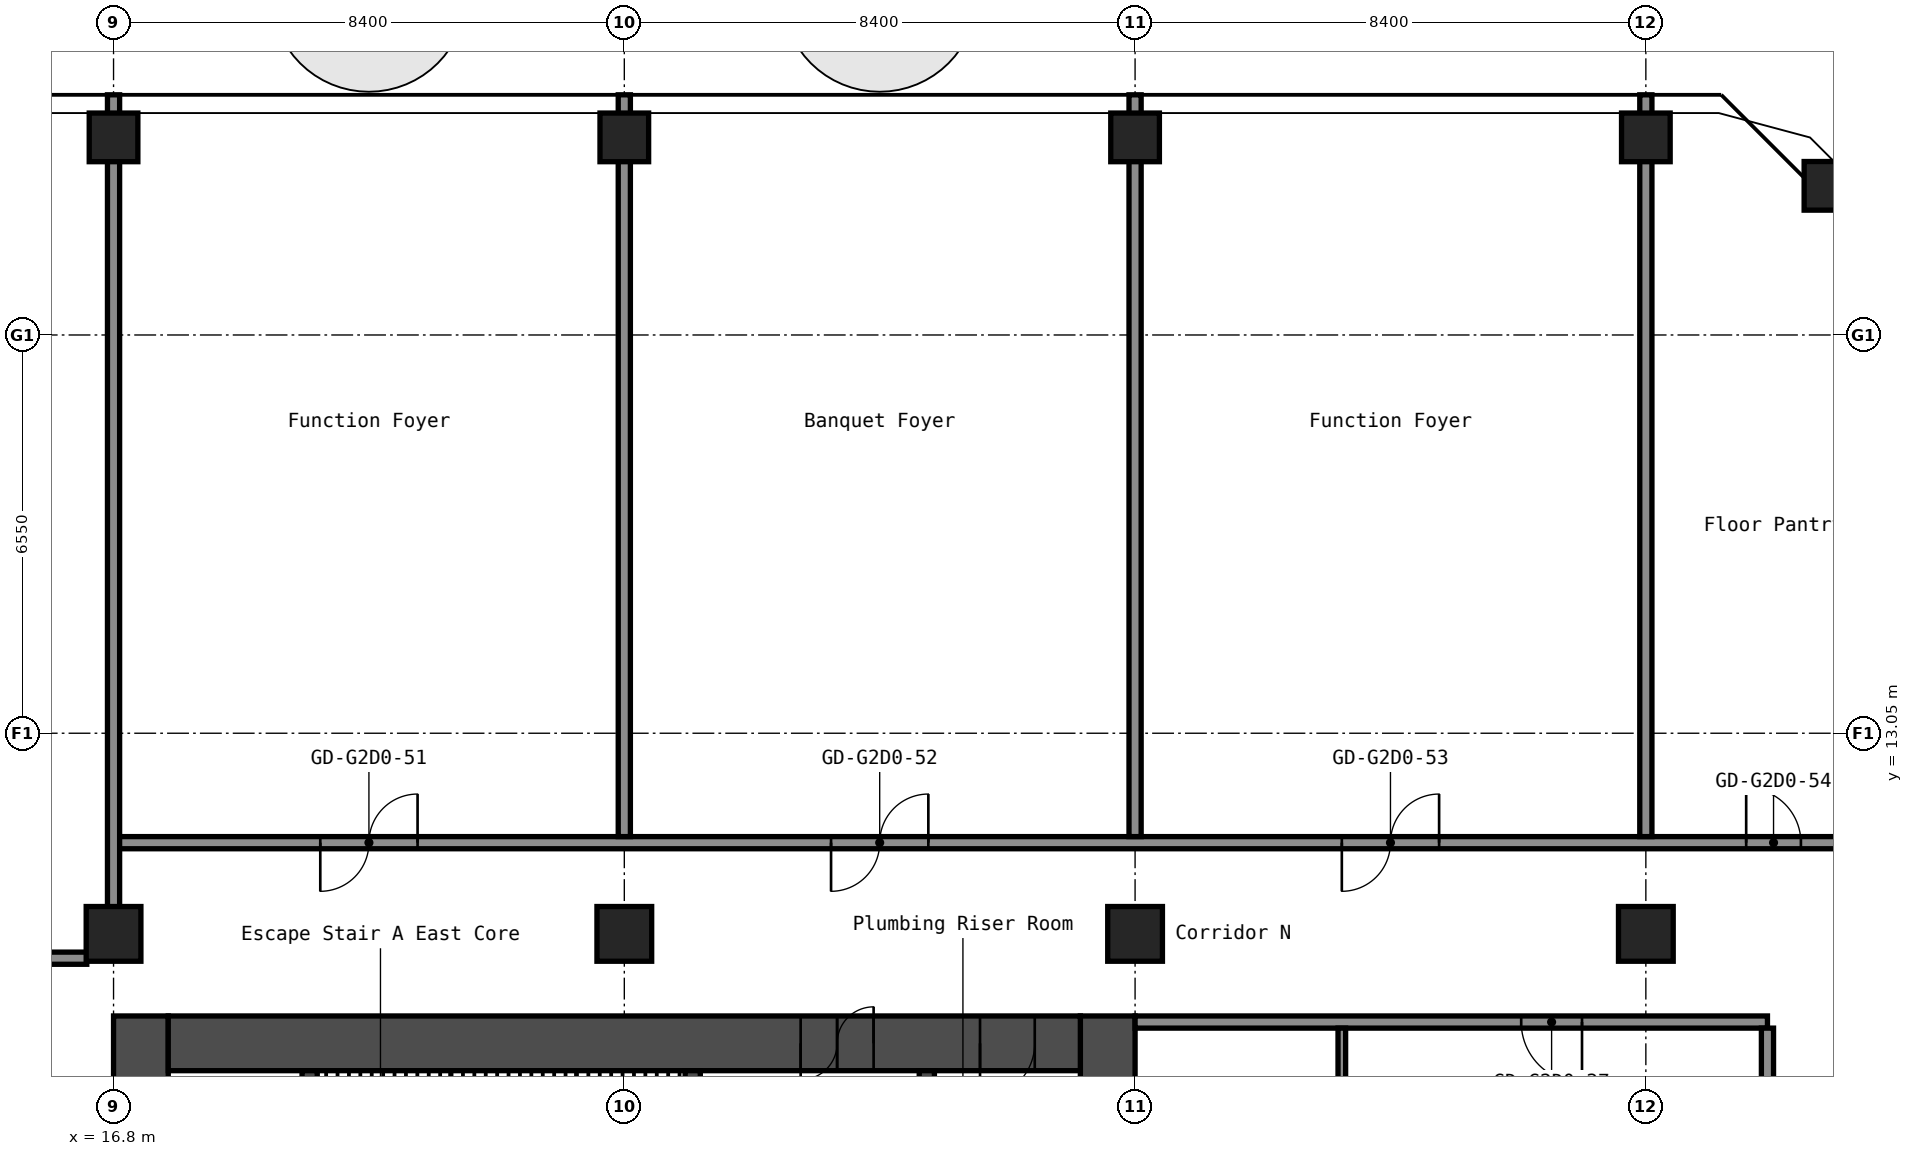
"""IFC4 building model, lengths in metres.
Left out: names, types, materials, properties, quantities, classifications, styles, units other than length and angle.
Written with IfcOpenShell. Run it as: python <this file> out.ifc"""

import sys

from ifc_helpers import new_model, si_unit, direction, frame, frame_2d, origin, origin_2d, place, context, subcontext, project, spatial, rectangle, hollow_rectangle, extrude, element, fill, save


model = new_model("IFC4")
c1 = context("Model", 3, precision=1e-05, world=origin(), true_north=direction((0.0, 1.0)))
c2 = subcontext(c1, "Body", "Model", "MODEL_VIEW")
j1 = project(units=[si_unit("LENGTHUNIT", "METRE"), si_unit("PLANEANGLEUNIT", "RADIAN")], contexts=[c1])
p1 = place(None, origin())
s1 = spatial("IfcSite", under=j1, at=p1, CompositionType="ELEMENT")
p2 = place(p1, origin())
s2 = spatial("IfcBuilding", under=s1, at=p2, CompositionType="ELEMENT")
p3 = place(p2, frame((0.0, 0.0, 85.0)))
s3 = spatial("IfcBuildingStorey", under=s2, at=p3, CompositionType="ELEMENT", Elevation=85.0)
p4 = place(p3, frame((16.8, 9.75, 0.0), z_axis=(0.0, 0.0, 1.0), x_axis=(1.0, 0.0, 0.0)))
e1 = element("IfcColumn", 1, at=p4, inside=s3, PredefinedType="COLUMN", context=c2, shape_type="SweptSolid", body=[
    extrude(hollow_rectangle(XDim=0.9, YDim=0.9, WallThickness=0.036, at=origin_2d()), origin(), (0.0, 0.0, 1.0), 2.8),
])
p5 = place(p3, frame((16.8, 22.85, 0.0), z_axis=(0.0, 0.0, 1.0), x_axis=(1.0, 0.0, 0.0)))
e2 = element("IfcColumn", 2, at=p5, inside=s3, PredefinedType="COLUMN", context=c2, shape_type="SweptSolid", body=[
    extrude(hollow_rectangle(XDim=0.8, YDim=0.8, WallThickness=0.032, at=origin_2d()), origin(), (0.0, 0.0, 1.0), 2.8),
])
p6 = place(p3, frame((25.2, 9.75, 0.0), z_axis=(0.0, 0.0, 1.0), x_axis=(1.0, 0.0, 0.0)))
e3 = element("IfcColumn", 3, at=p6, inside=s3, PredefinedType="COLUMN", context=c2, shape_type="SweptSolid", body=[
    extrude(hollow_rectangle(XDim=0.9, YDim=0.9, WallThickness=0.036, at=origin_2d()), origin(), (0.0, 0.0, 1.0), 2.8),
])
p7 = place(p3, frame((25.2, 22.85, 0.0), z_axis=(0.0, 0.0, 1.0), x_axis=(1.0, 0.0, 0.0)))
e4 = element("IfcColumn", 4, at=p7, inside=s3, PredefinedType="COLUMN", context=c2, shape_type="SweptSolid", body=[
    extrude(hollow_rectangle(XDim=0.8, YDim=0.8, WallThickness=0.032, at=origin_2d()), origin(), (0.0, 0.0, 1.0), 2.8),
])
p8 = place(p3, frame((33.6, 9.75, 0.0), z_axis=(0.0, 0.0, 1.0), x_axis=(1.0, 0.0, 0.0)))
e5 = element("IfcColumn", 5, at=p8, inside=s3, PredefinedType="COLUMN", context=c2, shape_type="SweptSolid", body=[
    extrude(hollow_rectangle(XDim=0.9, YDim=0.9, WallThickness=0.036, at=origin_2d()), origin(), (0.0, 0.0, 1.0), 2.8),
])
p9 = place(p3, frame((33.6, 22.85, 0.0), z_axis=(0.0, 0.0, 1.0), x_axis=(1.0, 0.0, 0.0)))
e6 = element("IfcColumn", 6, at=p9, inside=s3, PredefinedType="COLUMN", context=c2, shape_type="SweptSolid", body=[
    extrude(hollow_rectangle(XDim=0.8, YDim=0.8, WallThickness=0.032, at=origin_2d()), origin(), (0.0, 0.0, 1.0), 2.8),
])
p10 = place(p3, frame((42.0, 9.75, 0.0), z_axis=(0.0, 0.0, 1.0), x_axis=(1.0, 0.0, 0.0)))
e7 = element("IfcColumn", 7, at=p10, inside=s3, PredefinedType="COLUMN", context=c2, shape_type="SweptSolid", body=[
    extrude(hollow_rectangle(XDim=0.9, YDim=0.9, WallThickness=0.036, at=origin_2d()), origin(), (0.0, 0.0, 1.0), 2.8),
])
for number, where, z_axis, x_axis in (
    (8, (42.0, 22.85, 0.0), (0.0, 0.0, 1.0), (1.0, 0.0, 0.0)),
    (9, (45.003, 22.053, 0.0), (0.0, 0.0, 1.0), (1.0, 0.0, 0.0)),
):
    element("IfcColumn", number, at=place(p3, frame(where, z_axis=z_axis, x_axis=x_axis)), inside=s3, PredefinedType="COLUMN", context=c2, shape_type="SweptSolid", body=[
        extrude(hollow_rectangle(XDim=0.8, YDim=0.8, WallThickness=0.032, at=origin_2d()), origin(), (0.0, 0.0, 1.0), 2.8),
    ])
p11 = place(p3, frame((17.25, -8.4, 0.0), z_axis=(0.0, 0.0, 1.0), x_axis=(0.0, 1.0, 0.0)))
e10 = element("IfcWall", 10, at=p11, inside=s3, PredefinedType="SHEAR", context=c2, shape_type="SweptSolid", body=[
    extrude(rectangle(XDim=16.8, YDim=0.9, at=frame_2d((8.4, 0.0))), origin(), (0.0, 0.0, 1.0), 2.8),
])
p12 = place(p11, frame((7.6, 0.0, 0.0)))
e11 = element("IfcOpeningElement", 11, at=p12, cuts=e10, PredefinedType="OPENING", context=c2, shape_type="SweptSolid", body=[
    extrude(rectangle(XDim=1.2, YDim=2.1, at=frame_2d((0.6, 1.05))), frame((0.0, 0.46, 0.0), z_axis=(0.0, -1.0, 0.0), x_axis=(1.0, 0.0, 0.0)), (0.0, 0.0, 1.0), 0.92),
])
p13 = place(p3, frame((33.15, -8.4, 0.0), z_axis=(0.0, 0.0, 1.0), x_axis=(0.0, 1.0, 0.0)))
e12 = element("IfcWall", 12, at=p13, inside=s3, PredefinedType="SHEAR", context=c2, shape_type="SweptSolid", body=[
    extrude(rectangle(XDim=16.8, YDim=0.9, at=frame_2d((8.4, 0.0))), origin(), (0.0, 0.0, 1.0), 2.8),
])
p14 = place(p3, frame((17.7, 7.95, 0.0), z_axis=(0.0, 0.0, 1.0), x_axis=(1.0, 0.0, 0.0)))
e13 = element("IfcWall", 13, at=p14, inside=s3, PredefinedType="SHEAR", context=c2, shape_type="SweptSolid", body=[
    extrude(rectangle(XDim=15.0, YDim=0.9, at=frame_2d((7.5, 0.0))), origin(), (0.0, 0.0, 1.0), 2.8),
])
p15 = place(p14, frame((10.4, 0.0, 0.0)))
e14 = element("IfcOpeningElement", 14, at=p15, cuts=e13, PredefinedType="OPENING", context=c2, shape_type="SweptSolid", body=[
    extrude(rectangle(XDim=1.2, YDim=2.1, at=frame_2d((0.6, 1.05))), frame((0.0, 0.46, 0.0), z_axis=(0.0, -1.0, 0.0), x_axis=(1.0, 0.0, 0.0)), (0.0, 0.0, 1.0), 0.92),
])
p16 = place(p14, frame((13.35, 0.0, 0.0)))
e15 = element("IfcOpeningElement", 15, at=p16, cuts=e13, PredefinedType="OPENING", context=c2, shape_type="SweptSolid", body=[
    extrude(rectangle(XDim=0.9, YDim=2.1, at=frame_2d((0.45, 1.05))), frame((0.0, 0.46, 0.0), z_axis=(0.0, -1.0, 0.0), x_axis=(1.0, 0.0, 0.0)), (0.0, 0.0, 1.0), 0.92),
])
p17 = place(p3, frame((20.025, 1.2, 0.0), z_axis=(0.0, 0.0, 1.0), x_axis=(0.0, 1.0, 0.0)))
e16 = element("IfcWall", 16, at=p17, inside=s3, PredefinedType="SHEAR", context=c2, shape_type="SweptSolid", body=[
    extrude(rectangle(XDim=6.3, YDim=0.25, at=frame_2d((3.15, 0.0))), origin(), (0.0, 0.0, 1.0), 2.8),
])
p18 = place(p3, frame((26.325, 3.75, 0.0), z_axis=(0.0, 0.0, 1.0), x_axis=(0.0, 1.0, 0.0)))
e17 = element("IfcWall", 17, at=p18, inside=s3, PredefinedType="SHEAR", context=c2, shape_type="SweptSolid", body=[
    extrude(rectangle(XDim=3.75, YDim=0.25, at=frame_2d((1.875, 0.0))), origin(), (0.0, 0.0, 1.0), 2.8),
])
p19 = place(p18, frame((1.25, 0.0, 0.0)))
e18 = element("IfcOpeningElement", 18, at=p19, cuts=e17, PredefinedType="OPENING", context=c2, shape_type="SweptSolid", body=[
    extrude(rectangle(XDim=1.2, YDim=2.1, at=frame_2d((0.6, 1.05))), frame((0.0, 0.135, 0.0), z_axis=(0.0, -1.0, 0.0), x_axis=(1.0, 0.0, 0.0)), (0.0, 0.0, 1.0), 0.27),
])
p20 = place(p3, frame((30.175, 1.45, 0.0), z_axis=(0.0, 0.0, 1.0), x_axis=(0.0, 1.0, 0.0)))
e19 = element("IfcWall", 19, at=p20, inside=s3, PredefinedType="SHEAR", context=c2, shape_type="SweptSolid", body=[
    extrude(rectangle(XDim=6.05, YDim=0.25, at=frame_2d((3.025, 0.0))), origin(), (0.0, 0.0, 1.0), 2.8),
])
p21 = place(p20, frame((2.625, 0.0, 0.0)))
e20 = element("IfcOpeningElement", 20, at=p21, cuts=e19, PredefinedType="OPENING", context=c2, shape_type="SweptSolid", body=[
    extrude(rectangle(XDim=1.1, YDim=2.1, at=frame_2d((0.55, 1.05))), frame((0.0, 0.135, 0.0), z_axis=(0.0, -1.0, 0.0), x_axis=(1.0, 0.0, 0.0)), (0.0, 0.0, 1.0), 0.27),
])
p22 = place(p3, frame((33.6, 8.3, 0.0), z_axis=(0.0, 0.0, 1.0), x_axis=(1.0, 0.0, 0.0)))
e21 = element("IfcWall", 21, at=p22, inside=s3, PredefinedType="PARTITIONING", context=c2, shape_type="SweptSolid", body=[
    extrude(rectangle(XDim=10.4, YDim=0.2, at=frame_2d((5.2, 0.0))), origin(), (0.0, 0.0, 1.0), 2.8),
])
p23 = place(p22, frame((6.35, 0.0, 0.0)))
e22 = element("IfcOpeningElement", 22, at=p23, cuts=e21, PredefinedType="OPENING", context=c2, shape_type="SweptSolid", body=[
    extrude(rectangle(XDim=1.0, YDim=2.1, at=frame_2d((0.5, 1.05))), frame((0.0, 0.11, 0.0), z_axis=(0.0, -1.0, 0.0), x_axis=(1.0, 0.0, 0.0)), (0.0, 0.0, 1.0), 0.22),
])
p24 = place(p3, frame((-16.36, 9.35, 0.0), z_axis=(0.0, 0.0, 1.0), x_axis=(1.0, 0.0, 0.0)))
e23 = element("IfcWall", 23, at=p24, inside=s3, PredefinedType="PARTITIONING", context=c2, shape_type="SweptSolid", body=[
    extrude(rectangle(XDim=32.72, YDim=0.2, at=frame_2d((16.36, 0.0))), origin(), (0.0, 0.0, 1.0), 2.8),
])
p25 = place(p24, frame((2.41, 0.0, 0.0)))
e24 = element("IfcOpeningElement", 24, at=p25, cuts=e23, PredefinedType="OPENING", context=c2, shape_type="SweptSolid", body=[
    extrude(rectangle(XDim=1.0, YDim=2.1, at=frame_2d((0.5, 1.05))), frame((0.0, 0.11, 0.0), z_axis=(0.0, -1.0, 0.0), x_axis=(1.0, 0.0, 0.0)), (0.0, 0.0, 1.0), 0.22),
])
p26 = place(p24, frame((4.11, 0.0, 0.0)))
e25 = element("IfcOpeningElement", 25, at=p26, cuts=e23, PredefinedType="OPENING", context=c2, shape_type="SweptSolid", body=[
    extrude(rectangle(XDim=1.0, YDim=2.1, at=frame_2d((0.5, 1.05))), frame((0.0, 0.11, 0.0), z_axis=(0.0, -1.0, 0.0), x_axis=(1.0, 0.0, 0.0)), (0.0, 0.0, 1.0), 0.22),
])
p27 = place(p24, frame((9.96, 0.0, 0.0)))
e26 = element("IfcOpeningElement", 26, at=p27, cuts=e23, PredefinedType="OPENING", context=c2, shape_type="SweptSolid", body=[
    extrude(rectangle(XDim=1.0, YDim=2.1, at=frame_2d((0.5, 1.05))), frame((0.0, 0.11, 0.0), z_axis=(0.0, -1.0, 0.0), x_axis=(1.0, 0.0, 0.0)), (0.0, 0.0, 1.0), 0.22),
])
p28 = place(p24, frame((19.21, 0.0, 0.0)))
e27 = element("IfcOpeningElement", 27, at=p28, cuts=e23, PredefinedType="OPENING", context=c2, shape_type="SweptSolid", body=[
    extrude(rectangle(XDim=1.0, YDim=2.1, at=frame_2d((0.5, 1.05))), frame((0.0, 0.11, 0.0), z_axis=(0.0, -1.0, 0.0), x_axis=(1.0, 0.0, 0.0)), (0.0, 0.0, 1.0), 0.22),
])
p29 = place(p24, frame((20.91, 0.0, 0.0)))
e28 = element("IfcOpeningElement", 28, at=p29, cuts=e23, PredefinedType="OPENING", context=c2, shape_type="SweptSolid", body=[
    extrude(rectangle(XDim=1.0, YDim=2.1, at=frame_2d((0.5, 1.05))), frame((0.0, 0.11, 0.0), z_axis=(0.0, -1.0, 0.0), x_axis=(1.0, 0.0, 0.0)), (0.0, 0.0, 1.0), 0.22),
])
p30 = place(p24, frame((30.16, 0.0, 0.0)))
e29 = element("IfcOpeningElement", 29, at=p30, cuts=e23, PredefinedType="OPENING", context=c2, shape_type="SweptSolid", body=[
    extrude(rectangle(XDim=1.0, YDim=2.1, at=frame_2d((0.5, 1.05))), frame((0.0, 0.11, 0.0), z_axis=(0.0, -1.0, 0.0), x_axis=(1.0, 0.0, 0.0)), (0.0, 0.0, 1.0), 0.22),
])
p31 = place(p3, frame((16.8, 11.25, 0.0), z_axis=(0.0, 0.0, 1.0), x_axis=(1.0, 0.0, 0.0)))
e30 = element("IfcWall", 30, at=p31, inside=s3, PredefinedType="PARTITIONING", context=c2, shape_type="SweptSolid", body=[
    extrude(rectangle(XDim=29.7, YDim=0.2, at=frame_2d((14.85, 0.0))), origin(), (0.0, 0.0, 1.0), 2.8),
])
p32 = place(p31, frame((3.4, 0.0, 0.0)))
e31 = element("IfcOpeningElement", 31, at=p32, cuts=e30, PredefinedType="OPENING", context=c2, shape_type="SweptSolid", body=[
    extrude(rectangle(XDim=1.6, YDim=2.1, at=frame_2d((0.8, 1.05))), frame((0.0, 0.11, 0.0), z_axis=(0.0, -1.0, 0.0), x_axis=(1.0, 0.0, 0.0)), (0.0, 0.0, 1.0), 0.22),
])
p33 = place(p31, frame((11.8, 0.0, 0.0)))
e32 = element("IfcOpeningElement", 32, at=p33, cuts=e30, PredefinedType="OPENING", context=c2, shape_type="SweptSolid", body=[
    extrude(rectangle(XDim=1.6, YDim=2.1, at=frame_2d((0.8, 1.05))), frame((0.0, 0.11, 0.0), z_axis=(0.0, -1.0, 0.0), x_axis=(1.0, 0.0, 0.0)), (0.0, 0.0, 1.0), 0.22),
])
p34 = place(p31, frame((20.2, 0.0, 0.0)))
e33 = element("IfcOpeningElement", 33, at=p34, cuts=e30, PredefinedType="OPENING", context=c2, shape_type="SweptSolid", body=[
    extrude(rectangle(XDim=1.6, YDim=2.1, at=frame_2d((0.8, 1.05))), frame((0.0, 0.11, 0.0), z_axis=(0.0, -1.0, 0.0), x_axis=(1.0, 0.0, 0.0)), (0.0, 0.0, 1.0), 0.22),
])
p35 = place(p31, frame((26.85, 0.0, 0.0)))
e34 = element("IfcOpeningElement", 34, at=p35, cuts=e30, PredefinedType="OPENING", context=c2, shape_type="SweptSolid", body=[
    extrude(rectangle(XDim=0.9, YDim=2.1, at=frame_2d((0.45, 1.05))), frame((0.0, 0.11, 0.0), z_axis=(0.0, -1.0, 0.0), x_axis=(1.0, 0.0, 0.0)), (0.0, 0.0, 1.0), 0.22),
])
p36 = place(p3, frame((16.8, 10.19, 0.0), z_axis=(0.0, 0.0, 1.0), x_axis=(0.0, 1.0, 0.0)))
e35 = element("IfcWall", 35, at=p36, inside=s3, PredefinedType="PARTITIONING", context=c2, shape_type="SweptSolid", body=[
    extrude(rectangle(XDim=13.36, YDim=0.2, at=frame_2d((6.68, 0.0))), origin(), (0.0, 0.0, 1.0), 2.8),
])
for number, where, z_axis, x_axis in (
    (36, (25.2, 11.35, 0.0), (0.0, 0.0, 1.0), (0.0, 1.0, 0.0)),
    (37, (33.6, 11.35, 0.0), (0.0, 0.0, 1.0), (0.0, 1.0, 0.0)),
):
    element("IfcWall", number, at=place(p3, frame(where, z_axis=z_axis, x_axis=x_axis)), inside=s3, PredefinedType="PARTITIONING", context=c2, shape_type="SweptSolid", body=[
        extrude(rectangle(XDim=12.2, YDim=0.2, at=frame_2d((6.1, 0.0))), origin(), (0.0, 0.0, 1.0), 2.8),
    ])
p37 = place(p3, frame((37.0, 4.9, 0.0), z_axis=(0.0, 0.0, 1.0), x_axis=(0.0, 1.0, 0.0)))
e38 = element("IfcWall", 38, at=p37, inside=s3, PredefinedType="PARTITIONING", context=c2, shape_type="SweptSolid", body=[
    extrude(rectangle(XDim=3.3, YDim=0.125, at=frame_2d((1.65, 0.0))), origin(), (0.0, 0.0, 1.0), 2.8),
])
p38 = place(p3, frame((42.0, 11.35, 0.0), z_axis=(0.0, 0.0, 1.0), x_axis=(0.0, 1.0, 0.0)))
e39 = element("IfcWall", 39, at=p38, inside=s3, PredefinedType="PARTITIONING", context=c2, shape_type="SweptSolid", body=[
    extrude(rectangle(XDim=12.2, YDim=0.2, at=frame_2d((6.1, 0.0))), origin(), (0.0, 0.0, 1.0), 2.8),
])
p39 = place(p3, frame((44.0, -8.2, 0.0), z_axis=(0.0, 0.0, 1.0), x_axis=(0.0, 1.0, 0.0)))
e40 = element("IfcWall", 40, at=p39, inside=s3, PredefinedType="PARTITIONING", context=c2, shape_type="SweptSolid", body=[
    extrude(rectangle(XDim=16.4, YDim=0.2, at=frame_2d((8.2, 0.0))), origin(), (0.0, 0.0, 1.0), 2.8),
])
p40 = place(p15, origin())
e41 = element("IfcDoor", 41, at=p40, inside=s3, OperationType="DOUBLE_DOOR_SINGLE_SWING", PredefinedType="DOOR", context=c2, shape_type="SweptSolid", body=[
    extrude(rectangle(XDim=1.2, YDim=2.1, at=frame_2d((0.6, 1.05))), frame((0.0, 0.025, 0.0), z_axis=(0.0, -1.0, 0.0), x_axis=(1.0, 0.0, 0.0)), (0.0, 0.0, 1.0), 0.05),
])
fill(e14, e41)
p41 = place(p16, origin())
e42 = element("IfcDoor", 42, at=p41, inside=s3, OperationType="SINGLE_SWING_LEFT", PredefinedType="DOOR", context=c2, shape_type="SweptSolid", body=[
    extrude(rectangle(XDim=0.9, YDim=2.1, at=frame_2d((0.45, 1.05))), frame((0.0, 0.025, 0.0), z_axis=(0.0, -1.0, 0.0), x_axis=(1.0, 0.0, 0.0)), (0.0, 0.0, 1.0), 0.05),
])
fill(e15, e42)
p42 = place(p23, origin())
e43 = element("IfcDoor", 43, at=p42, inside=s3, OperationType="SINGLE_SWING_RIGHT", PredefinedType="DOOR", context=c2, shape_type="SweptSolid", body=[
    extrude(rectangle(XDim=1.0, YDim=2.1, at=frame_2d((0.5, 1.05))), frame((0.0, 0.025, 0.0), z_axis=(0.0, -1.0, 0.0), x_axis=(1.0, 0.0, 0.0)), (0.0, 0.0, 1.0), 0.05),
])
fill(e22, e43)
p43 = place(p32, origin())
e44 = element("IfcDoor", 44, at=p43, inside=s3, OperationType="DOUBLE_DOOR_SINGLE_SWING", PredefinedType="DOOR", context=c2, shape_type="SweptSolid", body=[
    extrude(rectangle(XDim=1.6, YDim=2.1, at=frame_2d((0.8, 1.05))), frame((0.0, 0.025, 0.0), z_axis=(0.0, -1.0, 0.0), x_axis=(1.0, 0.0, 0.0)), (0.0, 0.0, 1.0), 0.05),
])
fill(e31, e44)
p44 = place(p33, origin())
e45 = element("IfcDoor", 45, at=p44, inside=s3, OperationType="DOUBLE_DOOR_SINGLE_SWING", PredefinedType="DOOR", context=c2, shape_type="SweptSolid", body=[
    extrude(rectangle(XDim=1.6, YDim=2.1, at=frame_2d((0.8, 1.05))), frame((0.0, 0.025, 0.0), z_axis=(0.0, -1.0, 0.0), x_axis=(1.0, 0.0, 0.0)), (0.0, 0.0, 1.0), 0.05),
])
fill(e32, e45)
p45 = place(p34, origin())
e46 = element("IfcDoor", 46, at=p45, inside=s3, OperationType="DOUBLE_DOOR_SINGLE_SWING", PredefinedType="DOOR", context=c2, shape_type="SweptSolid", body=[
    extrude(rectangle(XDim=1.6, YDim=2.1, at=frame_2d((0.8, 1.05))), frame((0.0, 0.025, 0.0), z_axis=(0.0, -1.0, 0.0), x_axis=(1.0, 0.0, 0.0)), (0.0, 0.0, 1.0), 0.05),
])
fill(e33, e46)
p46 = place(p35, origin())
e47 = element("IfcDoor", 47, at=p46, inside=s3, OperationType="SINGLE_SWING_RIGHT", PredefinedType="DOOR", context=c2, shape_type="SweptSolid", body=[
    extrude(rectangle(XDim=0.9, YDim=2.1, at=frame_2d((0.45, 1.05))), frame((0.0, 0.025, 0.0), z_axis=(0.0, -1.0, 0.0), x_axis=(1.0, 0.0, 0.0)), (0.0, 0.0, 1.0), 0.05),
])
fill(e34, e47)
save(model, sys.argv[1])
